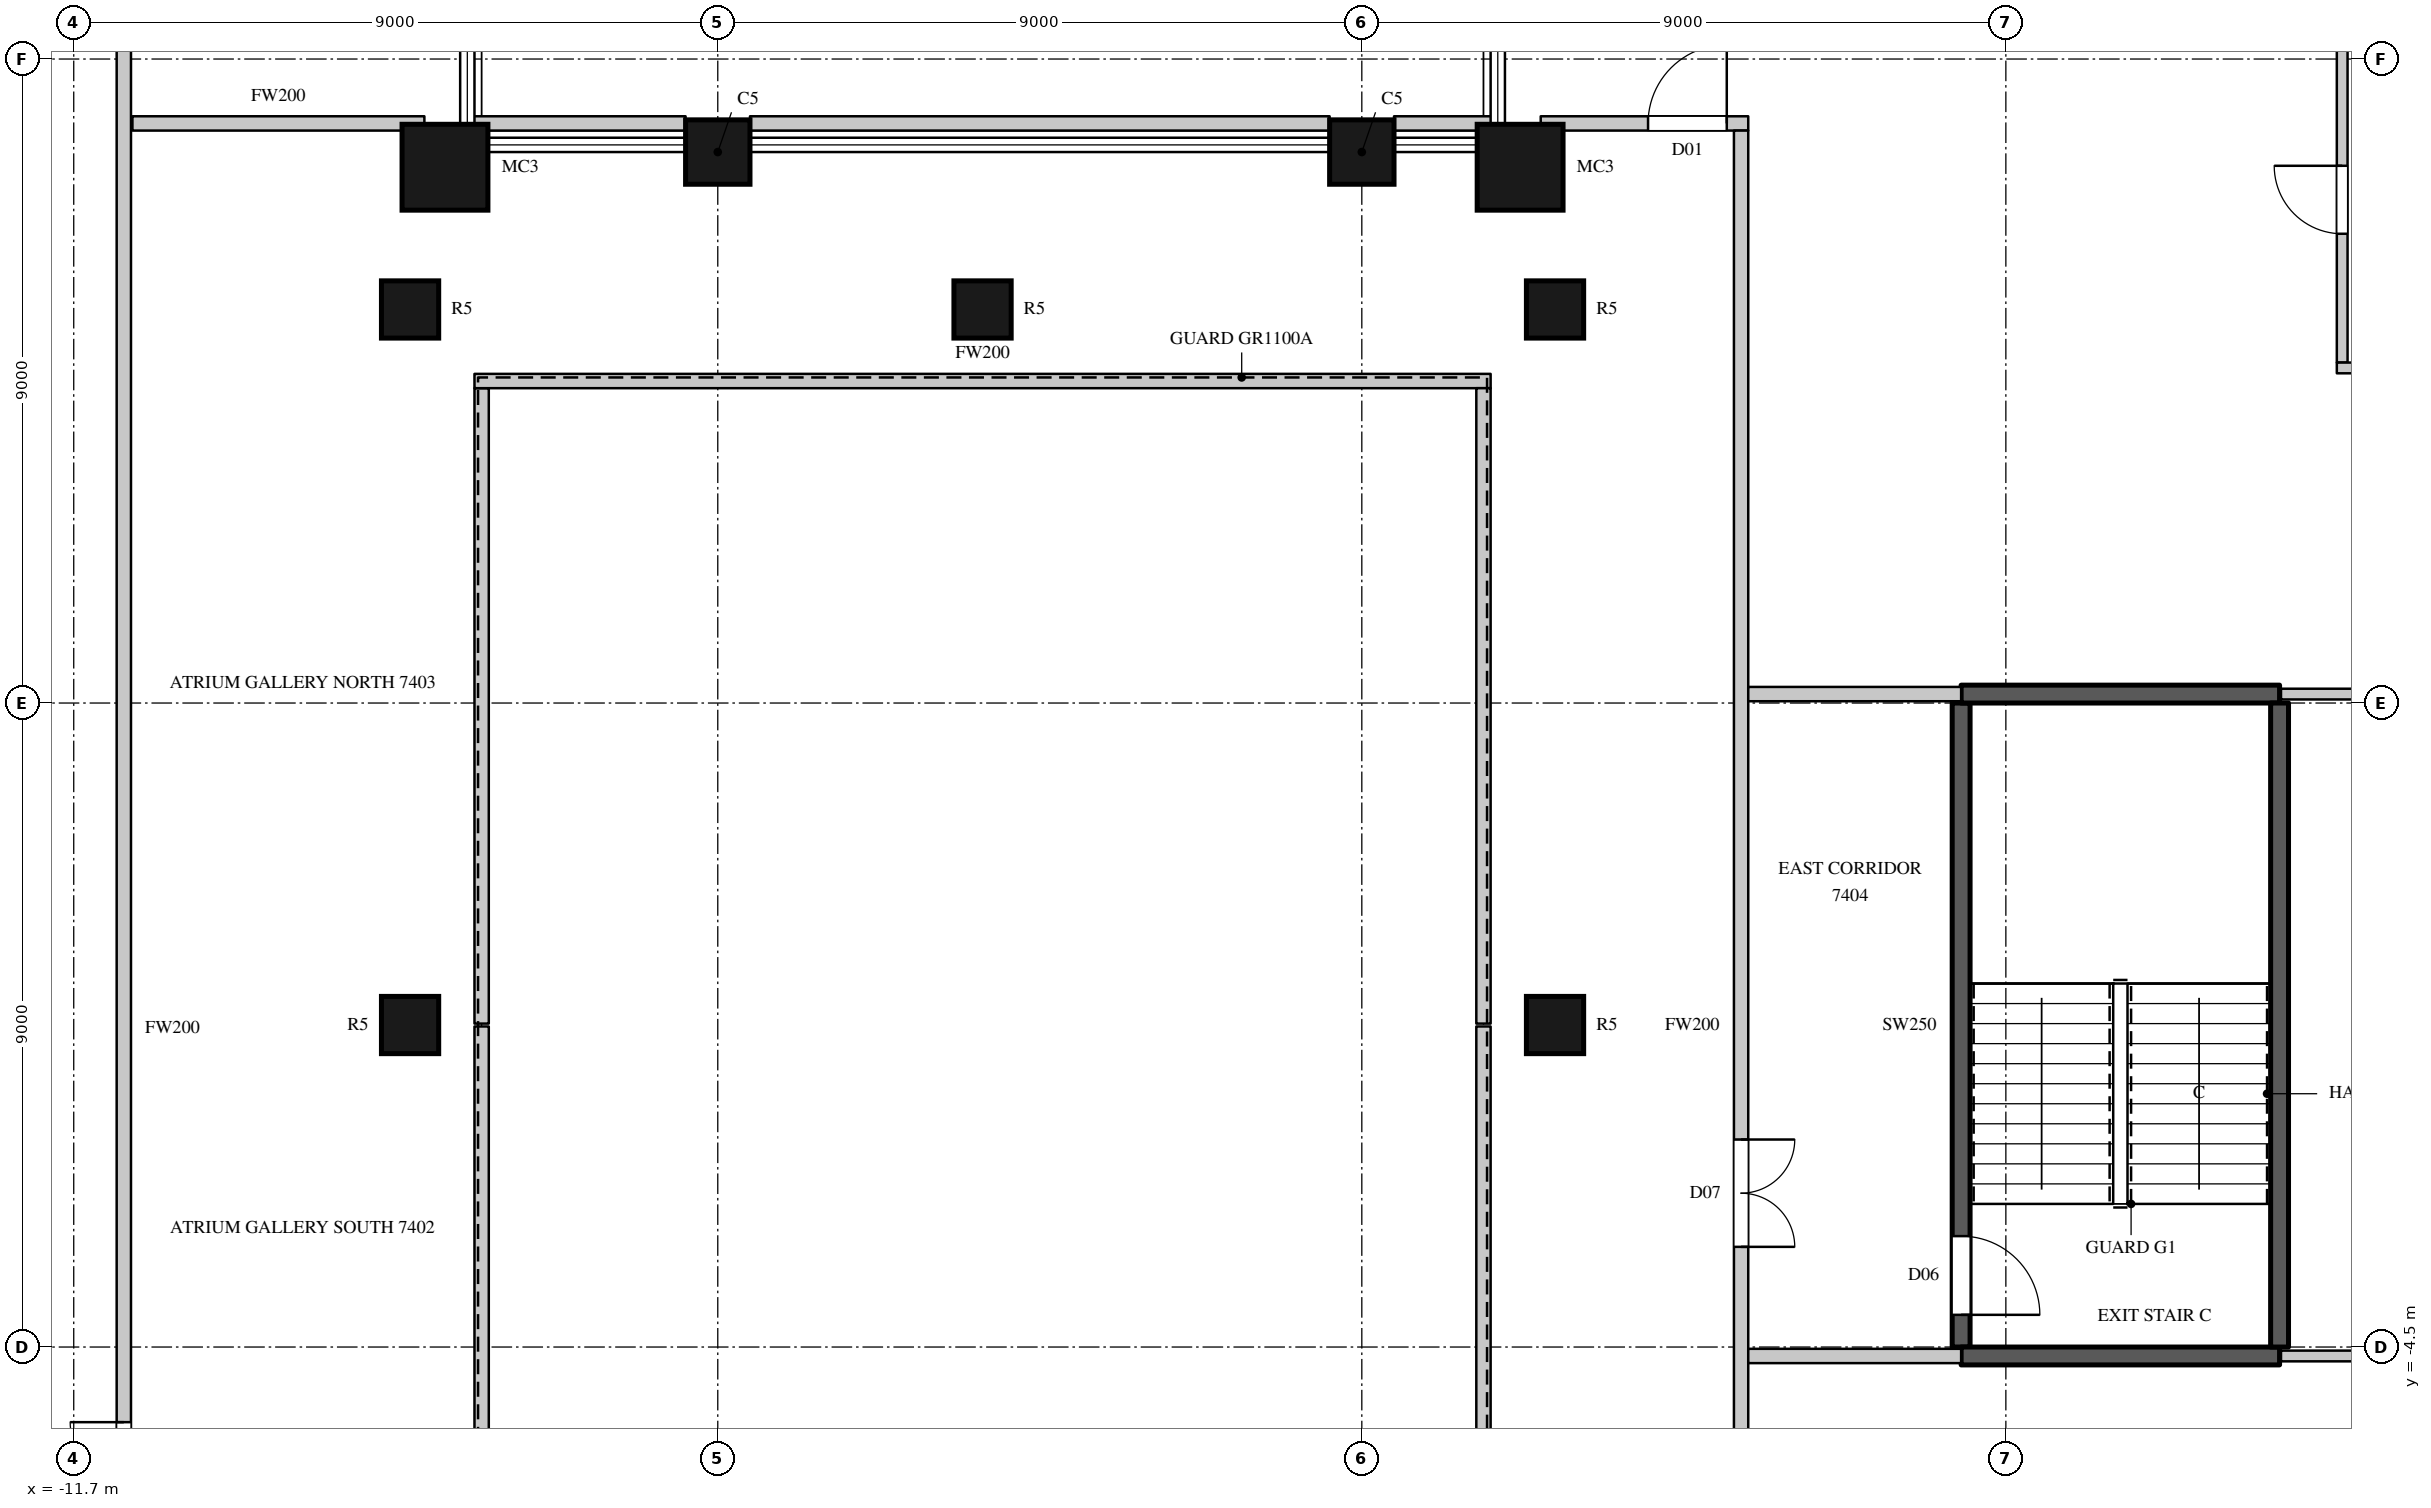
"""IFC4 building model, lengths in metres.
Left out: names, types, materials, properties, quantities, classifications, styles, units other than length and angle.
Written with IfcOpenShell. Run it as: python <this file> out.ifc"""

import sys

from ifc_helpers import new_model, si_unit, direction, frame, frame_2d, origin, origin_2d, place, context, subcontext, project, spatial, rectangle, circle, extrude, element, fill, save


model = new_model("IFC4")
c1 = context("Model", 3, precision=1e-05, world=origin(), true_north=direction((0.0, 1.0)))
c2 = subcontext(c1, "Body", "Model", "MODEL_VIEW")
j1 = project(units=[si_unit("LENGTHUNIT", "METRE"), si_unit("PLANEANGLEUNIT", "RADIAN")], contexts=[c1])
p1 = place(None, origin())
s1 = spatial("IfcSite", under=j1, at=p1, CompositionType="ELEMENT")
p2 = place(p1, origin())
s2 = spatial("IfcBuilding", under=s1, at=p2, CompositionType="ELEMENT")
p3 = place(p2, frame((0.0, 0.0, 325.4)))
s3 = spatial("IfcBuildingStorey", under=s2, at=p3, CompositionType="ELEMENT", Elevation=325.4)
p4 = place(p3, frame((8.512, 11.988, 0.0), z_axis=(0.0, 0.0, 1.0), x_axis=(1.0, 0.0, 0.0)))
e1 = element("IfcColumn", 1, at=p4, inside=s3, PredefinedType="COLUMN", context=c2, shape_type="SweptSolid", body=[
    extrude(circle(Radius=0.6, at=origin_2d()), origin(), (0.0, 0.0, 1.0), 4.1),
])
for number, where, z_axis, x_axis in (
    (2, (6.3, 12.2, 0.0), (0.0, 0.0, 1.0), (-1.0, 0.0, 0.0)),
    (3, (-2.7, 12.2, 0.0), (0.0, 0.0, 1.0), (-1.0, 0.0, 0.0)),
):
    element("IfcColumn", number, at=place(p3, frame(where, z_axis=z_axis, x_axis=x_axis)), inside=s3, PredefinedType="COLUMN", context=c2, shape_type="SweptSolid", body=[
        extrude(rectangle(XDim=0.9, YDim=0.9, at=origin_2d()), origin(), (0.0, 0.0, 1.0), 4.1),
    ])
p5 = place(p3, frame((-6.512, 11.988, 0.0), z_axis=(0.0, 0.0, 1.0), x_axis=(1.0, 0.0, 0.0)))
e4 = element("IfcColumn", 4, at=p5, inside=s3, PredefinedType="COLUMN", context=c2, shape_type="SweptSolid", body=[
    extrude(circle(Radius=0.6, at=origin_2d()), origin(), (0.0, 0.0, 1.0), 4.1),
])
for number, where, z_axis, x_axis in (
    (5, (-7.0, 0.0, 0.0), (0.0, 0.0, 1.0), (1.0, 0.0, 0.0)),
    (6, (-7.0, 10.0, 0.0), (0.0, 0.0, 1.0), (1.0, 0.0, 0.0)),
    (7, (1.0, 10.0, 0.0), (0.0, 0.0, 1.0), (1.0, 0.0, 0.0)),
    (8, (9.0, 0.0, 0.0), (0.0, 0.0, 1.0), (1.0, 0.0, 0.0)),
    (9, (9.0, 10.0, 0.0), (0.0, 0.0, 1.0), (1.0, 0.0, 0.0)),
):
    element("IfcColumn", number, at=place(p3, frame(where, z_axis=z_axis, x_axis=x_axis)), inside=s3, PredefinedType="COLUMN", context=c2, shape_type="SweptSolid", body=[
        extrude(circle(Radius=0.4, at=origin_2d()), origin(), (0.0, 0.0, 1.0), 4.1),
    ])
p6 = place(p3, frame((-11.0, -14.8, 0.0), z_axis=(0.0, 0.0, 1.0), x_axis=(0.0, 1.0, 0.0)))
e10 = element("IfcWall", 10, at=p6, inside=s3, PredefinedType="PARTITIONING", context=c2, shape_type="SweptSolid", body=[
    extrude(rectangle(XDim=29.5, YDim=0.2, at=frame_2d((14.75, 0.0))), origin(), (0.0, 0.0, 1.0), 3.8),
])
p7 = place(p6, frame((7.75, 0.0, 0.0)))
e11 = element("IfcOpeningElement", 11, at=p7, cuts=e10, PredefinedType="OPENING", context=c2, shape_type="SweptSolid", body=[
    extrude(rectangle(XDim=1.5, YDim=2.4, at=frame_2d((0.75, 1.2))), frame((0.0, 0.11, 0.0), z_axis=(0.0, -1.0, 0.0), x_axis=(1.0, 0.0, 0.0)), (0.0, 0.0, 1.0), 0.22),
])
p8 = place(p3, frame((-10.88, 12.6, 0.0), z_axis=(0.0, 0.0, 1.0), x_axis=(1.0, 0.0, 0.0)))
e12 = element("IfcWall", 12, at=p8, inside=s3, PredefinedType="PARTITIONING", context=c2, shape_type="SweptSolid", body=[
    extrude(rectangle(XDim=4.08, YDim=0.2, at=frame_2d((2.04, 0.0))), origin(), (0.0, 0.0, 1.0), 3.8),
])
p9 = place(p3, frame((-6.23, 12.6, 0.0), z_axis=(0.0, 0.0, 1.0), x_axis=(1.0, 0.0, 0.0)))
e13 = element("IfcWall", 13, at=p9, inside=s3, PredefinedType="PARTITIONING", context=c2, shape_type="SweptSolid", body=[
    extrude(rectangle(XDim=3.08, YDim=0.2, at=frame_2d((1.54, 0.0))), origin(), (0.0, 0.0, 1.0), 3.8),
])
p10 = place(p3, frame((-2.25, 12.6, 0.0), z_axis=(0.0, 0.0, 1.0), x_axis=(1.0, 0.0, 0.0)))
e14 = element("IfcWall", 14, at=p10, inside=s3, PredefinedType="PARTITIONING", context=c2, shape_type="SweptSolid", body=[
    extrude(rectangle(XDim=8.1, YDim=0.2, at=frame_2d((4.05, 0.0))), origin(), (0.0, 0.0, 1.0), 3.8),
])
p11 = place(p3, frame((6.75, 12.6, 0.0), z_axis=(0.0, 0.0, 1.0), x_axis=(1.0, 0.0, 0.0)))
e15 = element("IfcWall", 15, at=p11, inside=s3, PredefinedType="PARTITIONING", context=c2, shape_type="SweptSolid", body=[
    extrude(rectangle(XDim=1.48, YDim=0.2, at=frame_2d((0.74, 0.0))), origin(), (0.0, 0.0, 1.0), 3.8),
])
for number, where, z_axis, x_axis in (
    (16, (-6.0, -8.9, 0.0), (0.0, 0.0, 1.0), (0.0, 1.0, 0.0)),
    (17, (-6.0, 0.02, 0.0), (0.0, 0.0, 1.0), (0.0, 1.0, 0.0)),
):
    element("IfcWall", number, at=place(p3, frame(where, z_axis=z_axis, x_axis=x_axis)), inside=s3, PredefinedType="PARTITIONING", context=c2, shape_type="SweptSolid", body=[
        extrude(rectangle(XDim=8.88, YDim=0.2, at=frame_2d((4.44, 0.0))), origin(), (0.0, 0.0, 1.0), 3.8),
    ])
p12 = place(p3, frame((-6.1, 9.0, 0.0), z_axis=(0.0, 0.0, 1.0), x_axis=(1.0, 0.0, 0.0)))
e18 = element("IfcWall", 18, at=p12, inside=s3, PredefinedType="PARTITIONING", context=c2, shape_type="SweptSolid", body=[
    extrude(rectangle(XDim=14.2, YDim=0.2, at=frame_2d((7.1, 0.0))), origin(), (0.0, 0.0, 1.0), 3.8),
])
for number, where, z_axis, x_axis in (
    (19, (8.0, -8.9, 0.0), (0.0, 0.0, 1.0), (0.0, 1.0, 0.0)),
    (20, (8.0, 0.02, 0.0), (0.0, 0.0, 1.0), (0.0, 1.0, 0.0)),
):
    element("IfcWall", number, at=place(p3, frame(where, z_axis=z_axis, x_axis=x_axis)), inside=s3, PredefinedType="PARTITIONING", context=c2, shape_type="SweptSolid", body=[
        extrude(rectangle(XDim=8.88, YDim=0.2, at=frame_2d((4.44, 0.0))), origin(), (0.0, 0.0, 1.0), 3.8),
    ])
p13 = place(p3, frame((8.8, 12.6, 0.0), z_axis=(0.0, 0.0, 1.0), x_axis=(1.0, 0.0, 0.0)))
e21 = element("IfcWall", 21, at=p13, inside=s3, PredefinedType="PARTITIONING", context=c2, shape_type="SweptSolid", body=[
    extrude(rectangle(XDim=2.9, YDim=0.2, at=frame_2d((1.45, 0.0))), origin(), (0.0, 0.0, 1.0), 3.8),
])
p14 = place(p13, frame((1.5, 0.0, 0.0)))
e22 = element("IfcOpeningElement", 22, at=p14, cuts=e21, PredefinedType="OPENING", context=c2, shape_type="SweptSolid", body=[
    extrude(rectangle(XDim=1.1, YDim=2.4, at=frame_2d((0.55, 1.2))), frame((0.0, 0.11, 0.0), z_axis=(0.0, -1.0, 0.0), x_axis=(1.0, 0.0, 0.0)), (0.0, 0.0, 1.0), 0.22),
])
p15 = place(p3, frame((11.6, -12.5, 0.0), z_axis=(0.0, 0.0, 1.0), x_axis=(0.0, 1.0, 0.0)))
e23 = element("IfcWall", 23, at=p15, inside=s3, PredefinedType="PARTITIONING", context=c2, shape_type="SweptSolid", body=[
    extrude(rectangle(XDim=25.0, YDim=0.2, at=frame_2d((12.5, 0.0))), origin(), (0.0, 0.0, 1.0), 3.8),
])
p16 = place(p15, frame((9.4, 0.0, 0.0)))
e24 = element("IfcOpeningElement", 24, at=p16, cuts=e23, PredefinedType="OPENING", context=c2, shape_type="SweptSolid", body=[
    extrude(rectangle(XDim=1.5, YDim=2.4, at=frame_2d((0.75, 1.2))), frame((0.0, 0.11, 0.0), z_axis=(0.0, -1.0, 0.0), x_axis=(1.0, 0.0, 0.0)), (0.0, 0.0, 1.0), 0.22),
])
p17 = place(p15, frame((5.5, 0.0, 0.0)))
e25 = element("IfcOpeningElement", 25, at=p17, cuts=e23, PredefinedType="OPENING", context=c2, shape_type="SweptSolid", body=[
    extrude(rectangle(XDim=1.1, YDim=2.4, at=frame_2d((0.55, 1.2))), frame((0.0, 0.11, 0.0), z_axis=(0.0, -1.0, 0.0), x_axis=(1.0, 0.0, 0.0)), (0.0, 0.0, 1.0), 0.22),
])
for number, where, z_axis, x_axis in (
    (26, (11.7, -4.625, 0.0), (0.0, 0.0, 1.0), (1.0, 0.0, 0.0)),
    (27, (11.7, 4.625, 0.0), (0.0, 0.0, 1.0), (1.0, 0.0, 0.0)),
):
    element("IfcWall", number, at=place(p3, frame(where, z_axis=z_axis, x_axis=x_axis)), inside=s3, PredefinedType="PARTITIONING", context=c2, shape_type="SweptSolid", body=[
        extrude(rectangle(XDim=2.975, YDim=0.2, at=frame_2d((1.488, 0.0))), origin(), (0.0, 0.0, 1.0), 3.8),
    ])
for number, where, z_axis, x_axis in (
    (28, (19.145, -4.625, 0.0), (0.0, 0.0, 1.0), (1.0, 0.0, 0.0)),
    (29, (19.145, 4.625, 0.0), (0.0, 0.0, 1.0), (1.0, 0.0, 0.0)),
):
    element("IfcWall", number, at=place(p3, frame(where, z_axis=z_axis, x_axis=x_axis)), inside=s3, PredefinedType="PARTITIONING", context=c2, shape_type="SweptSolid", body=[
        extrude(rectangle(XDim=4.705, YDim=0.15, at=frame_2d((2.353, 0.0))), origin(), (0.0, 0.0, 1.0), 3.8),
    ])
p18 = place(p3, frame((20.0, 9.258, 0.0), z_axis=(0.0, 0.0, 1.0), x_axis=(0.0, 1.0, 0.0)))
e30 = element("IfcWall", 30, at=p18, inside=s3, PredefinedType="PARTITIONING", context=c2, shape_type="SweptSolid", body=[
    extrude(rectangle(XDim=4.532, YDim=0.15, at=frame_2d((2.266, 0.0))), origin(), (0.0, 0.0, 1.0), 3.8),
])
p19 = place(p18, frame((1.8, 0.0, 0.0)))
e31 = element("IfcOpeningElement", 31, at=p19, cuts=e30, PredefinedType="OPENING", context=c2, shape_type="SweptSolid", body=[
    extrude(rectangle(XDim=0.95, YDim=2.2, at=frame_2d((0.475, 1.1))), frame((0.0, 0.085, 0.0), z_axis=(0.0, -1.0, 0.0), x_axis=(1.0, 0.0, 0.0)), (0.0, 0.0, 1.0), 0.17),
])
p20 = place(p3, frame((19.925, 9.183, 0.0), z_axis=(0.0, 0.0, 1.0), x_axis=(1.0, 0.0, 0.0)))
e32 = element("IfcWall", 32, at=p20, inside=s3, PredefinedType="PARTITIONING", context=c2, shape_type="SweptSolid", body=[
    extrude(rectangle(XDim=4.375, YDim=0.15, at=frame_2d((2.188, 0.0))), origin(), (0.0, 0.0, 1.0), 3.8),
])
p21 = place(p3, frame((14.675, -4.5, 0.0), z_axis=(0.0, 0.0, 1.0), x_axis=(0.0, 1.0, 0.0)))
e33 = element("IfcWall", 33, at=p21, inside=s3, PredefinedType="SHEAR", context=c2, shape_type="SweptSolid", body=[
    extrude(rectangle(XDim=9.0, YDim=0.25, at=frame_2d((4.5, 0.0))), origin(), (0.0, 0.0, 1.0), 3.8),
])
p22 = place(p21, frame((0.45, 0.0, 0.0)))
e34 = element("IfcOpeningElement", 34, at=p22, cuts=e33, PredefinedType="OPENING", context=c2, shape_type="SweptSolid", body=[
    extrude(rectangle(XDim=1.1, YDim=2.2, at=frame_2d((0.55, 1.1))), frame((0.0, 0.135, 0.0), z_axis=(0.0, -1.0, 0.0), x_axis=(1.0, 0.0, 0.0)), (0.0, 0.0, 1.0), 0.27),
])
for number, where, z_axis, x_axis in (
    (35, (14.675, -4.625, 0.0), (0.0, 0.0, 1.0), (1.0, 0.0, 0.0)),
    (36, (14.675, 4.625, 0.0), (0.0, 0.0, 1.0), (1.0, 0.0, 0.0)),
):
    element("IfcWall", number, at=place(p3, frame(where, z_axis=z_axis, x_axis=x_axis)), inside=s3, PredefinedType="SHEAR", context=c2, shape_type="SweptSolid", body=[
        extrude(rectangle(XDim=4.45, YDim=0.25, at=frame_2d((2.225, 0.0))), origin(), (0.0, 0.0, 1.0), 3.8),
    ])
p23 = place(p3, frame((19.125, -4.5, 0.0), z_axis=(0.0, 0.0, 1.0), x_axis=(0.0, 1.0, 0.0)))
e37 = element("IfcWall", 37, at=p23, inside=s3, PredefinedType="SHEAR", context=c2, shape_type="SweptSolid", body=[
    extrude(rectangle(XDim=9.0, YDim=0.25, at=frame_2d((4.5, 0.0))), origin(), (0.0, 0.0, 1.0), 3.8),
])
p24 = place(p7, origin())
e38 = element("IfcDoor", 38, at=p24, inside=s3, OperationType="DOUBLE_DOOR_SINGLE_SWING", PredefinedType="DOOR", context=c2, shape_type="SweptSolid", body=[
    extrude(rectangle(XDim=1.5, YDim=2.4, at=frame_2d((0.75, 1.2))), frame((0.0, 0.025, 0.0), z_axis=(0.0, -1.0, 0.0), x_axis=(1.0, 0.0, 0.0)), (0.0, 0.0, 1.0), 0.05),
])
fill(e11, e38)
p25 = place(p16, origin())
e39 = element("IfcDoor", 39, at=p25, inside=s3, OperationType="DOUBLE_DOOR_SINGLE_SWING", PredefinedType="DOOR", context=c2, shape_type="SweptSolid", body=[
    extrude(rectangle(XDim=1.5, YDim=2.4, at=frame_2d((0.75, 1.2))), frame((0.0, 0.025, 0.0), z_axis=(0.0, -1.0, 0.0), x_axis=(1.0, 0.0, 0.0)), (0.0, 0.0, 1.0), 0.05),
])
fill(e24, e39)
p26 = place(p14, origin())
e40 = element("IfcDoor", 40, at=p26, inside=s3, OperationType="SINGLE_SWING_RIGHT", PredefinedType="DOOR", context=c2, shape_type="SweptSolid", body=[
    extrude(rectangle(XDim=1.1, YDim=2.4, at=frame_2d((0.55, 1.2))), frame((0.0, 0.025, 0.0), z_axis=(0.0, -1.0, 0.0), x_axis=(1.0, 0.0, 0.0)), (0.0, 0.0, 1.0), 0.05),
])
fill(e22, e40)
p27 = place(p19, origin())
e41 = element("IfcDoor", 41, at=p27, inside=s3, OperationType="SINGLE_SWING_RIGHT", PredefinedType="DOOR", context=c2, shape_type="SweptSolid", body=[
    extrude(rectangle(XDim=0.95, YDim=2.2, at=frame_2d((0.475, 1.1))), frame((0.0, 0.025, 0.0), z_axis=(0.0, -1.0, 0.0), x_axis=(1.0, 0.0, 0.0)), (0.0, 0.0, 1.0), 0.05),
])
fill(e31, e41)
p28 = place(p22, origin())
e42 = element("IfcDoor", 42, at=p28, inside=s3, OperationType="SINGLE_SWING_RIGHT", PredefinedType="DOOR", context=c2, shape_type="SweptSolid", body=[
    extrude(rectangle(XDim=1.1, YDim=2.2, at=frame_2d((0.55, 1.1))), frame((0.0, 0.025, 0.0), z_axis=(0.0, -1.0, 0.0), x_axis=(1.0, 0.0, 0.0)), (0.0, 0.0, 1.0), 0.05),
])
fill(e34, e42)
save(model, sys.argv[1])
